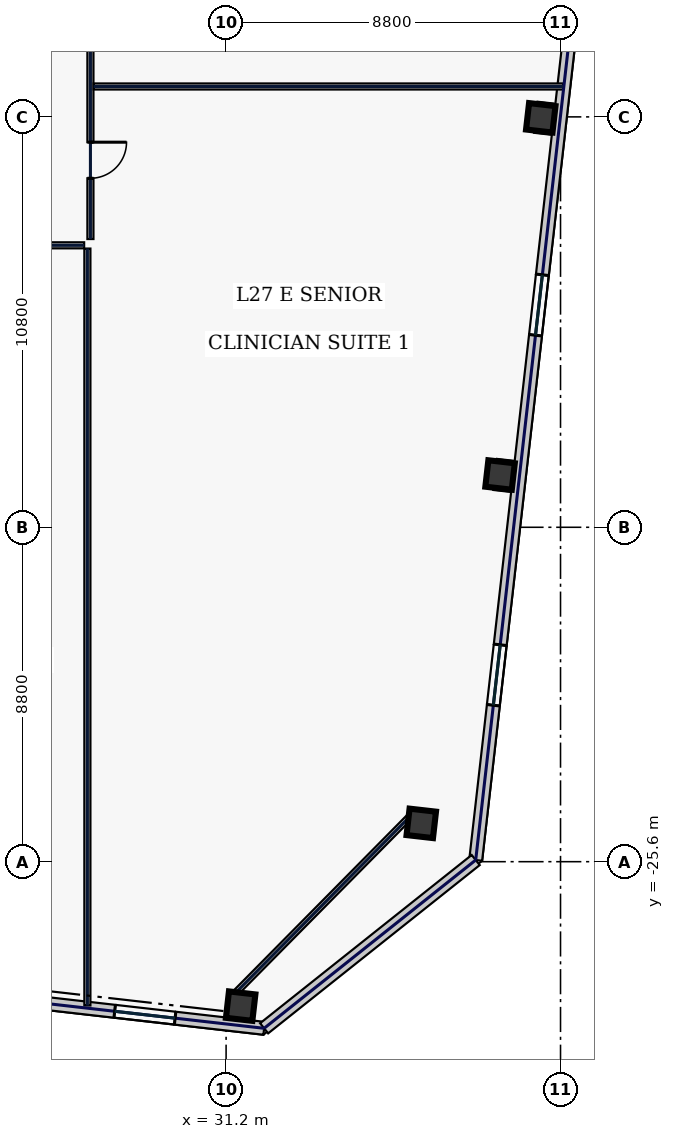
"""IFC4 building model, lengths in metres.
Left out: names, types, materials, properties, quantities, classifications, styles, units other than length and angle.
Written with IfcOpenShell. Run it as: python <this file> out.ifc"""

import sys

from ifc_helpers import new_model, si_unit, direction, frame, frame_2d, origin, origin_2d, place, context, subcontext, project, spatial, rectangle, hollow_rectangle, extrude, element, fill, save


model = new_model("IFC4")
c1 = context("Model", 3, precision=1e-05, world=origin(), true_north=direction((0.0, 1.0)))
c2 = subcontext(c1, "Body", "Model", "MODEL_VIEW")
j1 = project(units=[si_unit("LENGTHUNIT", "METRE"), si_unit("PLANEANGLEUNIT", "RADIAN")], contexts=[c1])
p1 = place(None, origin())
s1 = spatial("IfcSite", under=j1, at=p1, CompositionType="ELEMENT")
p2 = place(p1, origin())
s2 = spatial("IfcBuilding", under=s1, at=p2, CompositionType="ELEMENT")
p3 = place(p2, frame((0.0, 0.0, 121.4)))
s3 = spatial("IfcBuildingStorey", under=s2, at=p3, CompositionType="ELEMENT", Elevation=121.4)
for number, where, z_axis, x_axis in (
    (1, (31.583, -29.401, 0.0), (0.0, 0.0, 1.0), (0.994, -0.113, 0.0)),
    (2, (36.336, -24.592, 0.0), (0.0, 0.0, 1.0), (0.994, -0.113, 0.0)),
    (3, (38.409, -15.424, 0.0), (0.0, 0.0, 1.0), (0.994, -0.113, 0.0)),
    (4, (39.48, -6.025, 0.0), (0.0, 0.0, 1.0), (0.994, -0.113, 0.0)),
):
    element("IfcColumn", number, at=place(p3, frame(where, z_axis=z_axis, x_axis=x_axis)), inside=s3, PredefinedType="COLUMN", context=c2, shape_type="SweptSolid", body=[
        extrude(hollow_rectangle(XDim=0.7, YDim=0.7, WallThickness=0.032, at=origin_2d()), origin(), (0.0, 0.0, 1.0), 3.74),
    ])
p4 = place(p3, frame((11.115, -27.582, 0.0), z_axis=(0.0, 0.0, 1.0), x_axis=(0.993572655904, -0.113196190044, 0.0)))
e5 = element("IfcWall", 5, at=p4, inside=s3, PredefinedType="STANDARD", context=c2, shape_type="SweptSolid", body=[
    extrude(rectangle(XDim=21.223, YDim=0.34, at=frame_2d((10.611, 0.0))), origin(), (0.0, 0.0, 1.0), 3.74),
])
p5 = place(p4, frame((3.616, 0.0, 0.67)))
e6 = element("IfcOpeningElement", 6, at=p5, cuts=e5, PredefinedType="OPENING", context=c2, shape_type="SweptSolid", body=[
    extrude(rectangle(XDim=2.1, YDim=2.2, at=frame_2d((1.05, 1.1))), frame((0.0, 0.18, 0.0), z_axis=(0.0, -1.0, 0.0), x_axis=(1.0, 0.0, 0.0)), (0.0, 0.0, 1.0), 0.36),
])
p6 = place(p4, frame((9.088, 0.0, 0.67)))
e7 = element("IfcOpeningElement", 7, at=p6, cuts=e5, PredefinedType="OPENING", context=c2, shape_type="SweptSolid", body=[
    extrude(rectangle(XDim=0.85, YDim=1.85, at=frame_2d((0.425, 0.925))), frame((0.0, 0.18, 0.0), z_axis=(0.0, -1.0, 0.0), x_axis=(1.0, 0.0, 0.0)), (0.0, 0.0, 1.0), 0.36),
])
p7 = place(p4, frame((14.044, 0.0, 0.67)))
e8 = element("IfcOpeningElement", 8, at=p7, cuts=e5, PredefinedType="OPENING", context=c2, shape_type="SweptSolid", body=[
    extrude(rectangle(XDim=0.85, YDim=1.85, at=frame_2d((0.425, 0.925))), frame((0.0, 0.18, 0.0), z_axis=(0.0, -1.0, 0.0), x_axis=(1.0, 0.0, 0.0)), (0.0, 0.0, 1.0), 0.36),
])
p8 = place(p4, frame((17.265, 0.0, 0.22)))
e9 = element("IfcOpeningElement", 9, at=p8, cuts=e5, PredefinedType="OPENING", context=c2, shape_type="SweptSolid", body=[
    extrude(rectangle(XDim=1.6, YDim=1.2, at=frame_2d((0.8, 0.6))), frame((0.0, 0.18, 0.0), z_axis=(0.0, -1.0, 0.0), x_axis=(1.0, 0.0, 0.0)), (0.0, 0.0, 1.0), 0.36),
])
p9 = place(p3, frame((37.768, -25.556, 0.0), z_axis=(0.0, 0.0, 1.0), x_axis=(0.113201605824, 0.993572038877, 0.0)))
e10 = element("IfcWall", 10, at=p9, inside=s3, PredefinedType="STANDARD", context=c2, shape_type="SweptSolid", body=[
    extrude(rectangle(XDim=39.2, YDim=0.34, at=frame_2d((19.6, 0.0))), origin(), (0.0, 0.0, 1.0), 3.74),
])
p10 = place(p9, frame((4.1, 0.0, 0.58)))
e11 = element("IfcOpeningElement", 11, at=p10, cuts=e10, PredefinedType="OPENING", context=c2, shape_type="SweptSolid", body=[
    extrude(rectangle(XDim=1.6, YDim=2.3, at=frame_2d((0.8, 1.15))), frame((0.0, 0.18, 0.0), z_axis=(0.0, -1.0, 0.0), x_axis=(1.0, 0.0, 0.0)), (0.0, 0.0, 1.0), 0.36),
])
p11 = place(p9, frame((13.9, 0.0, 0.58)))
e12 = element("IfcOpeningElement", 12, at=p11, cuts=e10, PredefinedType="OPENING", context=c2, shape_type="SweptSolid", body=[
    extrude(rectangle(XDim=1.6, YDim=2.3, at=frame_2d((0.8, 1.15))), frame((0.0, 0.18, 0.0), z_axis=(0.0, -1.0, 0.0), x_axis=(1.0, 0.0, 0.0)), (0.0, 0.0, 1.0), 0.36),
])
p12 = place(p9, frame((23.7, 0.0, 0.58)))
e13 = element("IfcOpeningElement", 13, at=p12, cuts=e10, PredefinedType="OPENING", context=c2, shape_type="SweptSolid", body=[
    extrude(rectangle(XDim=1.6, YDim=2.3, at=frame_2d((0.8, 1.15))), frame((0.0, 0.18, 0.0), z_axis=(0.0, -1.0, 0.0), x_axis=(1.0, 0.0, 0.0)), (0.0, 0.0, 1.0), 0.36),
])
p13 = place(p9, frame((33.5, 0.0, 0.58)))
e14 = element("IfcOpeningElement", 14, at=p13, cuts=e10, PredefinedType="OPENING", context=c2, shape_type="SweptSolid", body=[
    extrude(rectangle(XDim=1.6, YDim=2.3, at=frame_2d((0.8, 1.15))), frame((0.0, 0.18, 0.0), z_axis=(0.0, -1.0, 0.0), x_axis=(1.0, 0.0, 0.0)), (0.0, 0.0, 1.0), 0.36),
])
p14 = place(p3, frame((32.201, -29.985, 0.0), z_axis=(0.0, 0.0, 1.0), x_axis=(0.78261359446, 0.622507800567, 0.0)))
e15 = element("IfcWall", 15, at=p14, inside=s3, PredefinedType="STANDARD", context=c2, shape_type="SweptSolid", body=[
    extrude(rectangle(XDim=7.114, YDim=0.34, at=frame_2d((3.557, 0.0))), origin(), (0.0, 0.0, 1.0), 3.74),
])
p15 = place(p3, frame((31.341, -29.162, 0.0), z_axis=(0.0, 0.0, 1.0), x_axis=(0.702905898933, 0.711282853192, 0.0)))
e16 = element("IfcWall", 16, at=p15, inside=s3, PredefinedType="PARTITIONING", context=c2, shape_type="SweptSolid", body=[
    extrude(rectangle(XDim=6.761, YDim=0.16, at=frame_2d((3.381, 0.0))), origin(), (0.0, 0.0, 1.0), 3.74),
])
p16 = place(p3, frame((27.63, 9.415, 0.0), z_axis=(0.0, 0.0, 1.0), x_axis=(0.0, -1.0, 0.0)))
e17 = element("IfcWall", 17, at=p16, inside=s3, PredefinedType="PARTITIONING", context=c2, shape_type="SweptSolid", body=[
    extrude(rectangle(XDim=18.63, YDim=0.16, at=frame_2d((9.315, 0.0))), origin(), (0.0, 0.0, 1.0), 3.74),
])
p17 = place(p16, frame((16.081, 0.0, 0.0)))
e18 = element("IfcOpeningElement", 18, at=p17, cuts=e17, PredefinedType="OPENING", context=c2, shape_type="SweptSolid", body=[
    extrude(rectangle(XDim=0.95, YDim=2.2, at=frame_2d((0.475, 1.1))), frame((0.0, 0.09, 0.0), z_axis=(0.0, -1.0, 0.0), x_axis=(1.0, 0.0, 0.0)), (0.0, 0.0, 1.0), 0.18),
])
p18 = place(p16, frame((11.3, 0.0, 0.0)))
e19 = element("IfcOpeningElement", 19, at=p18, cuts=e17, PredefinedType="OPENING", context=c2, shape_type="SweptSolid", body=[
    extrude(rectangle(XDim=0.95, YDim=2.2, at=frame_2d((0.475, 1.1))), frame((0.0, 0.09, 0.0), z_axis=(0.0, -1.0, 0.0), x_axis=(1.0, 0.0, 0.0)), (0.0, 0.0, 1.0), 0.18),
])
p19 = place(p16, frame((5.8, 0.0, 0.0)))
e20 = element("IfcOpeningElement", 20, at=p19, cuts=e17, PredefinedType="OPENING", context=c2, shape_type="SweptSolid", body=[
    extrude(rectangle(XDim=0.95, YDim=2.2, at=frame_2d((0.475, 1.1))), frame((0.0, 0.09, 0.0), z_axis=(0.0, -1.0, 0.0), x_axis=(1.0, 0.0, 0.0)), (0.0, 0.0, 1.0), 0.18),
])
p20 = place(p16, frame((1.869, 0.0, 0.0)))
e21 = element("IfcOpeningElement", 21, at=p20, cuts=e17, PredefinedType="OPENING", context=c2, shape_type="SweptSolid", body=[
    extrude(rectangle(XDim=0.95, YDim=2.2, at=frame_2d((0.475, 1.1))), frame((0.0, 0.09, 0.0), z_axis=(0.0, -1.0, 0.0), x_axis=(1.0, 0.0, 0.0)), (0.0, 0.0, 1.0), 0.18),
])
p21 = place(p3, frame((27.465, -9.38, 0.0), z_axis=(0.0, 0.0, 1.0), x_axis=(-1.0, 0.0, 0.0)))
e22 = element("IfcWall", 22, at=p21, inside=s3, PredefinedType="PARTITIONING", context=c2, shape_type="SweptSolid", body=[
    extrude(rectangle(XDim=54.93, YDim=0.16, at=frame_2d((27.465, 0.0))), origin(), (0.0, 0.0, 1.0), 3.74),
])
p22 = place(p21, frame((50.056, 0.0, 0.0)))
e23 = element("IfcOpeningElement", 23, at=p22, cuts=e22, PredefinedType="OPENING", context=c2, shape_type="SweptSolid", body=[
    extrude(rectangle(XDim=1.05, YDim=2.2, at=frame_2d((0.525, 1.1))), frame((0.0, 0.09, 0.0), z_axis=(0.0, -1.0, 0.0), x_axis=(1.0, 0.0, 0.0)), (0.0, 0.0, 1.0), 0.18),
])
p23 = place(p21, frame((40.35, 0.0, 0.0)))
e24 = element("IfcOpeningElement", 24, at=p23, cuts=e22, PredefinedType="OPENING", context=c2, shape_type="SweptSolid", body=[
    extrude(rectangle(XDim=0.95, YDim=2.2, at=frame_2d((0.475, 1.1))), frame((0.0, 0.09, 0.0), z_axis=(0.0, -1.0, 0.0), x_axis=(1.0, 0.0, 0.0)), (0.0, 0.0, 1.0), 0.18),
])
p24 = place(p21, frame((29.75, 0.0, 0.0)))
e25 = element("IfcOpeningElement", 25, at=p24, cuts=e22, PredefinedType="OPENING", context=c2, shape_type="SweptSolid", body=[
    extrude(rectangle(XDim=0.95, YDim=2.2, at=frame_2d((0.475, 1.1))), frame((0.0, 0.09, 0.0), z_axis=(0.0, -1.0, 0.0), x_axis=(1.0, 0.0, 0.0)), (0.0, 0.0, 1.0), 0.18),
])
p25 = place(p21, frame((20.25, 0.0, 0.0)))
e26 = element("IfcOpeningElement", 26, at=p25, cuts=e22, PredefinedType="OPENING", context=c2, shape_type="SweptSolid", body=[
    extrude(rectangle(XDim=0.95, YDim=2.2, at=frame_2d((0.475, 1.1))), frame((0.0, 0.09, 0.0), z_axis=(0.0, -1.0, 0.0), x_axis=(1.0, 0.0, 0.0)), (0.0, 0.0, 1.0), 0.18),
])
p26 = place(p21, frame((11.85, 0.0, 0.0)))
e27 = element("IfcOpeningElement", 27, at=p26, cuts=e22, PredefinedType="OPENING", context=c2, shape_type="SweptSolid", body=[
    extrude(rectangle(XDim=1.15, YDim=2.2, at=frame_2d((0.575, 1.1))), frame((0.0, 0.09, 0.0), z_axis=(0.0, -1.0, 0.0), x_axis=(1.0, 0.0, 0.0)), (0.0, 0.0, 1.0), 0.18),
])
p27 = place(p21, frame((5.562, 0.0, 0.0)))
e28 = element("IfcOpeningElement", 28, at=p27, cuts=e22, PredefinedType="OPENING", context=c2, shape_type="SweptSolid", body=[
    extrude(rectangle(XDim=1.05, YDim=2.2, at=frame_2d((0.525, 1.1))), frame((0.0, 0.09, 0.0), z_axis=(0.0, -1.0, 0.0), x_axis=(1.0, 0.0, 0.0)), (0.0, 0.0, 1.0), 0.18),
])
p28 = place(p21, frame((1.582, 0.0, 0.0)))
e29 = element("IfcOpeningElement", 29, at=p28, cuts=e22, PredefinedType="OPENING", context=c2, shape_type="SweptSolid", body=[
    extrude(rectangle(XDim=0.95, YDim=2.2, at=frame_2d((0.475, 1.1))), frame((0.0, 0.09, 0.0), z_axis=(0.0, -1.0, 0.0), x_axis=(1.0, 0.0, 0.0)), (0.0, 0.0, 1.0), 0.18),
])
p29 = place(p3, frame((27.55, -29.385, 0.0), z_axis=(0.0, 0.0, 1.0), x_axis=(0.0, 1.0, 0.0)))
e30 = element("IfcWall", 30, at=p29, inside=s3, PredefinedType="PARTITIONING", context=c2, shape_type="SweptSolid", body=[
    extrude(rectangle(XDim=19.919, YDim=0.16, at=frame_2d((9.96, 0.0))), origin(), (0.0, 0.0, 1.0), 3.74),
])
p30 = place(p3, frame((27.715, -5.2, 0.0), z_axis=(0.0, 0.0, 1.0), x_axis=(1.0, 0.0, 0.0)))
e31 = element("IfcWall", 31, at=p30, inside=s3, PredefinedType="PARTITIONING", context=c2, shape_type="SweptSolid", body=[
    extrude(rectangle(XDim=12.352, YDim=0.16, at=frame_2d((6.176, 0.0))), origin(), (0.0, 0.0, 1.0), 3.74),
])
p31 = place(p8, origin())
e32 = element("IfcWindow", 32, at=p31, inside=s3, PartitioningType="SINGLE_PANEL", PredefinedType="WINDOW", context=c2, shape_type="SweptSolid", body=[
    extrude(rectangle(XDim=1.6, YDim=1.2, at=frame_2d((0.8, 0.6))), frame((0.0, 0.03, 0.0), z_axis=(0.0, -1.0, 0.0), x_axis=(1.0, 0.0, 0.0)), (0.0, 0.0, 1.0), 0.06),
])
fill(e9, e32)
p32 = place(p10, origin())
e33 = element("IfcWindow", 33, at=p32, inside=s3, PartitioningType="SINGLE_PANEL", PredefinedType="WINDOW", context=c2, shape_type="SweptSolid", body=[
    extrude(rectangle(XDim=1.6, YDim=2.3, at=frame_2d((0.8, 1.15))), frame((0.0, 0.03, 0.0), z_axis=(0.0, -1.0, 0.0), x_axis=(1.0, 0.0, 0.0)), (0.0, 0.0, 1.0), 0.06),
])
fill(e11, e33)
p33 = place(p11, origin())
e34 = element("IfcWindow", 34, at=p33, inside=s3, PartitioningType="SINGLE_PANEL", PredefinedType="WINDOW", context=c2, shape_type="SweptSolid", body=[
    extrude(rectangle(XDim=1.6, YDim=2.3, at=frame_2d((0.8, 1.15))), frame((0.0, 0.03, 0.0), z_axis=(0.0, -1.0, 0.0), x_axis=(1.0, 0.0, 0.0)), (0.0, 0.0, 1.0), 0.06),
])
fill(e12, e34)
p34 = place(p17, origin())
e35 = element("IfcDoor", 35, at=p34, inside=s3, OperationType="SINGLE_SWING_LEFT", PredefinedType="DOOR", context=c2, shape_type="SweptSolid", body=[
    extrude(rectangle(XDim=0.95, YDim=2.2, at=frame_2d((0.475, 1.1))), frame((0.0, 0.025, 0.0), z_axis=(0.0, -1.0, 0.0), x_axis=(1.0, 0.0, 0.0)), (0.0, 0.0, 1.0), 0.05),
])
fill(e18, e35)
save(model, sys.argv[1])
